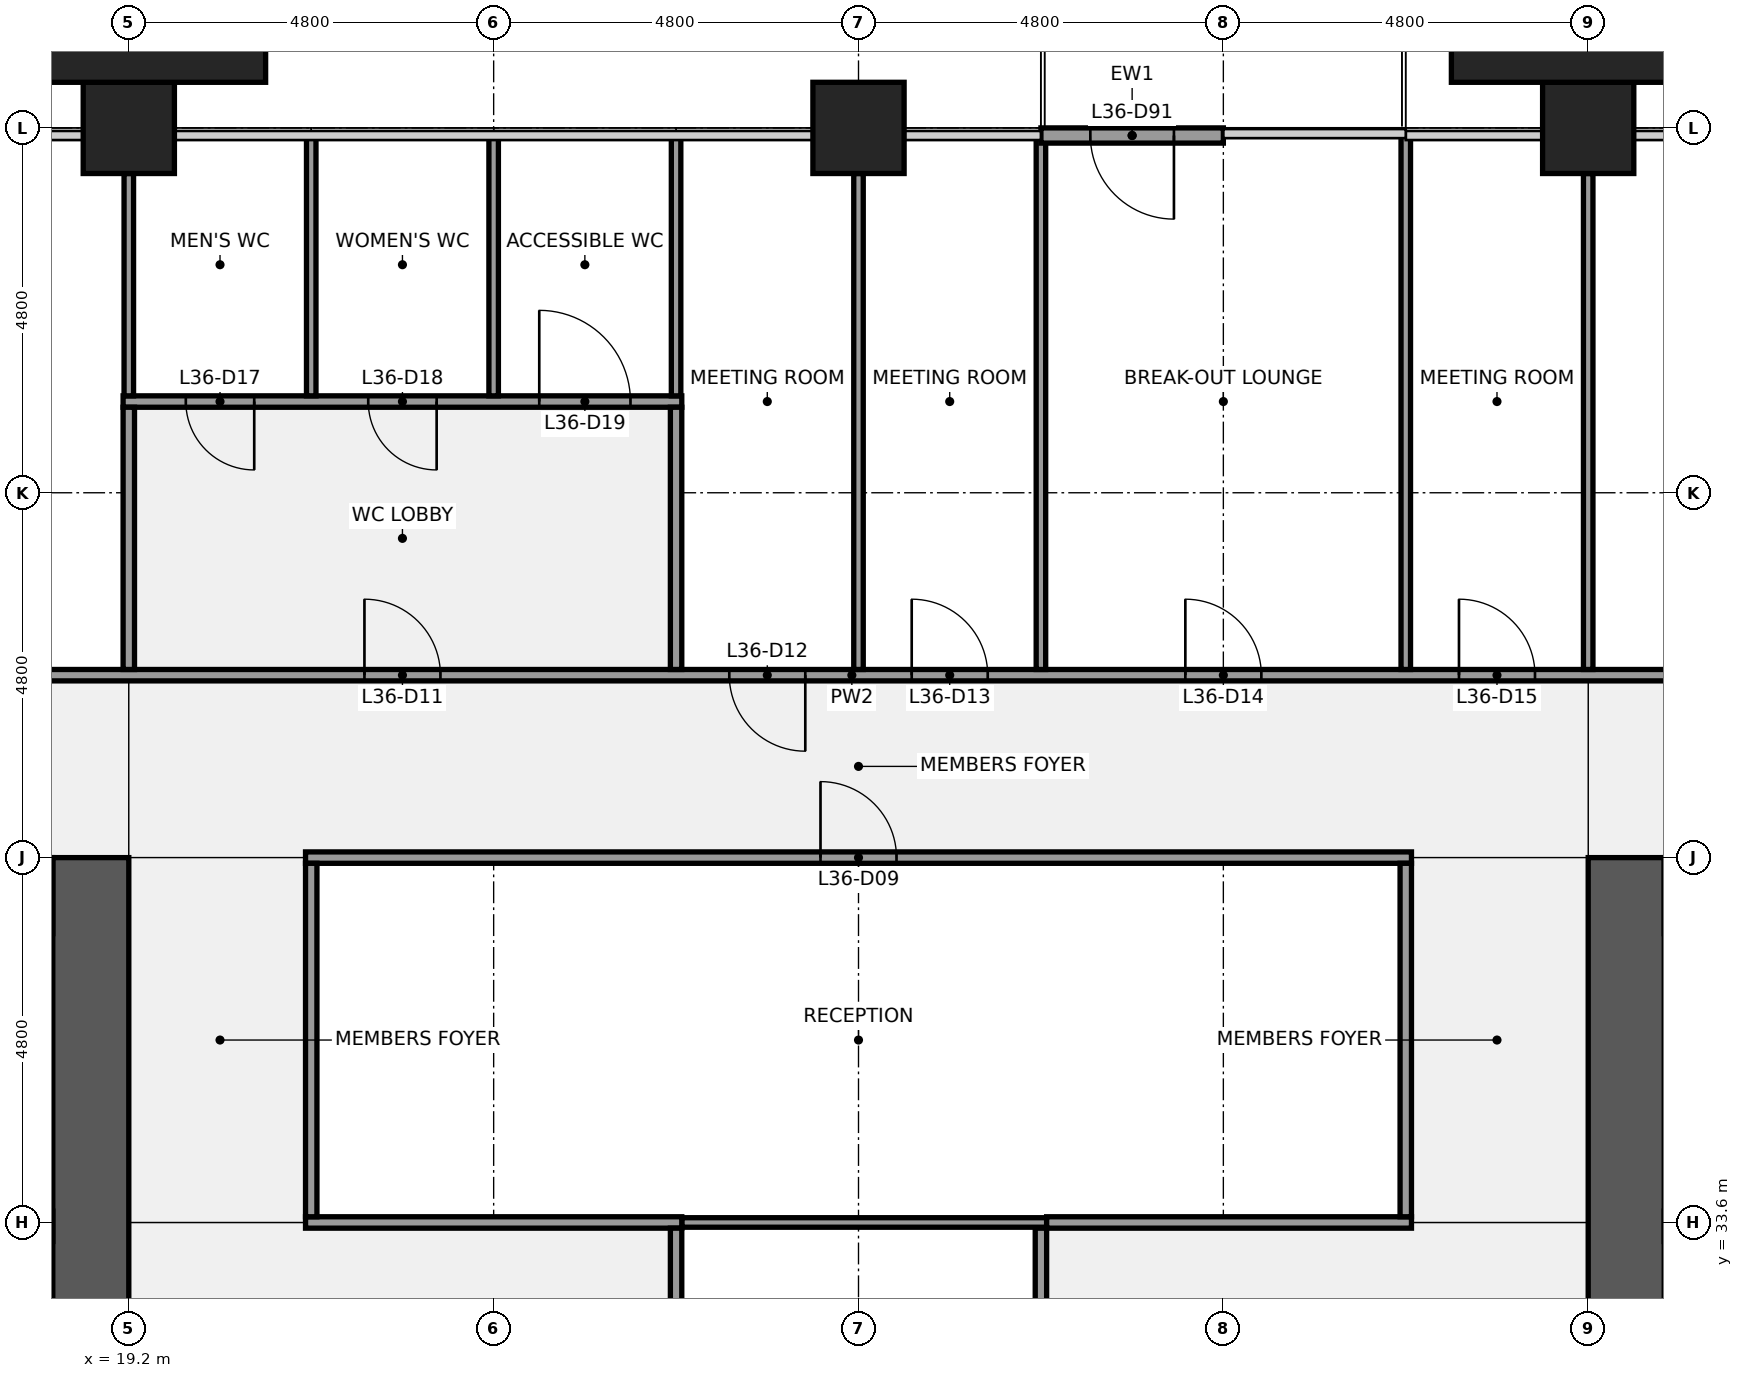
"""IFC4 building model, lengths in metres.
Left out: names, types, materials, properties, quantities, classifications, styles, units other than length and angle.
Written with IfcOpenShell. Run it as: python <this file> out.ifc"""

import sys

from ifc_helpers import new_model, si_unit, direction, frame, frame_2d, origin, origin_2d, place, context, subcontext, project, spatial, rectangle, extrude, element, fill, save


model = new_model("IFC4")
c1 = context("Model", 3, precision=1e-05, world=origin(), true_north=direction((0.0, 1.0)))
c2 = subcontext(c1, "Body", "Model", "MODEL_VIEW")
j1 = project(units=[si_unit("LENGTHUNIT", "METRE"), si_unit("PLANEANGLEUNIT", "RADIAN")], contexts=[c1])
p1 = place(None, origin())
s1 = spatial("IfcSite", under=j1, at=p1, CompositionType="ELEMENT")
p2 = place(p1, origin())
s2 = spatial("IfcBuilding", under=s1, at=p2, CompositionType="ELEMENT")
p3 = place(p2, frame((0.0, 0.0, 164.1)))
s3 = spatial("IfcBuildingStorey", under=s2, at=p3, CompositionType="ELEMENT", Elevation=164.1)
for number, where, z_axis, x_axis in (
    (1, (19.2, 48.0, 0.0), (0.0, 0.0, 1.0), (1.0, 0.0, 0.0)),
    (2, (28.8, 48.0, 0.0), (0.0, 0.0, 1.0), (1.0, 0.0, 0.0)),
    (3, (38.4, 48.0, 0.0), (0.0, 0.0, 1.0), (1.0, 0.0, 0.0)),
):
    element("IfcColumn", number, at=place(p3, frame(where, z_axis=z_axis, x_axis=x_axis)), inside=s3, PredefinedType="COLUMN", context=c2, shape_type="SweptSolid", body=[
        extrude(rectangle(XDim=1.2, YDim=1.2, at=origin_2d()), origin(), (0.0, 0.0, 1.0), 4.0),
    ])
p4 = place(p3, frame((18.7, 38.4, 0.0), z_axis=(0.0, 0.0, 1.0), x_axis=(0.0, -1.0, 0.0)))
e4 = element("IfcWall", 4, at=p4, inside=s3, PredefinedType="SHEAR", context=c2, shape_type="SweptSolid", body=[
    extrude(rectangle(XDim=28.8, YDim=1.0, at=frame_2d((14.4, 0.0))), origin(), (0.0, 0.0, 1.0), 3.84),
])
p5 = place(p4, frame((18.3, 0.0, 0.0)))
e5 = element("IfcOpeningElement", 5, at=p5, cuts=e4, PredefinedType="OPENING", context=c2, shape_type="SweptSolid", body=[
    extrude(rectangle(XDim=1.8, YDim=2.1, at=frame_2d((0.9, 1.05))), frame((0.0, 0.51, 0.0), z_axis=(0.0, -1.0, 0.0), x_axis=(1.0, 0.0, 0.0)), (0.0, 0.0, 1.0), 1.02),
])
p6 = place(p4, frame((8.7, 0.0, 0.0)))
e6 = element("IfcOpeningElement", 6, at=p6, cuts=e4, PredefinedType="OPENING", context=c2, shape_type="SweptSolid", body=[
    extrude(rectangle(XDim=1.8, YDim=2.1, at=frame_2d((0.9, 1.05))), frame((0.0, 0.51, 0.0), z_axis=(0.0, -1.0, 0.0), x_axis=(1.0, 0.0, 0.0)), (0.0, 0.0, 1.0), 1.02),
])
p7 = place(p3, frame((1.0, 33.55, 0.0), z_axis=(0.0, 0.0, 1.0), x_axis=(1.0, 0.0, 0.0)))
e7 = element("IfcWall", 7, at=p7, inside=s3, PredefinedType="SHEAR", context=c2, shape_type="SweptSolid", body=[
    extrude(rectangle(XDim=17.2, YDim=0.4, at=frame_2d((8.6, 0.0))), origin(), (0.0, 0.0, 1.0), 3.84),
])
p8 = place(p3, frame((38.9, 9.6, 0.0), z_axis=(0.0, 0.0, 1.0), x_axis=(0.0, 1.0, 0.0)))
e8 = element("IfcWall", 8, at=p8, inside=s3, PredefinedType="SHEAR", context=c2, shape_type="SweptSolid", body=[
    extrude(rectangle(XDim=28.8, YDim=1.0, at=frame_2d((14.4, 0.0))), origin(), (0.0, 0.0, 1.0), 3.84),
])
p9 = place(p8, frame((8.7, 0.0, 0.0)))
e9 = element("IfcOpeningElement", 9, at=p9, cuts=e8, PredefinedType="OPENING", context=c2, shape_type="SweptSolid", body=[
    extrude(rectangle(XDim=1.8, YDim=2.1, at=frame_2d((0.9, 1.05))), frame((0.0, 0.51, 0.0), z_axis=(0.0, -1.0, 0.0), x_axis=(1.0, 0.0, 0.0)), (0.0, 0.0, 1.0), 1.02),
])
p10 = place(p8, frame((18.3, 0.0, 0.0)))
e10 = element("IfcOpeningElement", 10, at=p10, cuts=e8, PredefinedType="OPENING", context=c2, shape_type="SweptSolid", body=[
    extrude(rectangle(XDim=1.8, YDim=2.1, at=frame_2d((0.9, 1.05))), frame((0.0, 0.51, 0.0), z_axis=(0.0, -1.0, 0.0), x_axis=(1.0, 0.0, 0.0)), (0.0, 0.0, 1.0), 1.02),
])
p11 = place(p3, frame((26.475, 33.6, 0.0), z_axis=(0.0, 0.0, 1.0), x_axis=(1.0, 0.0, 0.0)))
e11 = element("IfcWall", 11, at=p11, inside=s3, PredefinedType="PARTITIONING", context=c2, shape_type="SweptSolid", body=[
    extrude(rectangle(XDim=4.8, YDim=0.125, at=frame_2d((2.4, 0.0))), origin(), (0.0, 0.0, 1.0), 2.936),
])
p12 = place(p3, frame((21.525, 33.6, 0.0), z_axis=(0.0, 0.0, 1.0), x_axis=(1.0, 0.0, 0.0)))
e12 = element("IfcWall", 12, at=p12, inside=s3, PredefinedType="PARTITIONING", context=c2, shape_type="SweptSolid", body=[
    extrude(rectangle(XDim=4.95, YDim=0.15, at=frame_2d((2.475, 0.0))), origin(), (0.0, 0.0, 1.0), 2.936),
])
p13 = place(p3, frame((31.275, 33.6, 0.0), z_axis=(0.0, 0.0, 1.0), x_axis=(1.0, 0.0, 0.0)))
e13 = element("IfcWall", 13, at=p13, inside=s3, PredefinedType="PARTITIONING", context=c2, shape_type="SweptSolid", body=[
    extrude(rectangle(XDim=4.8, YDim=0.15, at=frame_2d((2.4, 0.0))), origin(), (0.0, 0.0, 1.0), 2.936),
])
p14 = place(p3, frame((21.525, 38.4, 0.0), z_axis=(0.0, 0.0, 1.0), x_axis=(1.0, 0.0, 0.0)))
e14 = element("IfcWall", 14, at=p14, inside=s3, PredefinedType="PARTITIONING", context=c2, shape_type="SweptSolid", body=[
    extrude(rectangle(XDim=14.55, YDim=0.15, at=frame_2d((7.275, 0.0))), origin(), (0.0, 0.0, 1.0), 2.936),
])
p15 = place(p14, frame((6.775, 0.0, 0.0)))
e15 = element("IfcOpeningElement", 15, at=p15, cuts=e14, PredefinedType="OPENING", context=c2, shape_type="SweptSolid", body=[
    extrude(rectangle(XDim=1.0, YDim=2.1, at=frame_2d((0.5, 1.05))), frame((0.0, 0.085, 0.0), z_axis=(0.0, -1.0, 0.0), x_axis=(1.0, 0.0, 0.0)), (0.0, 0.0, 1.0), 0.17),
])
p16 = place(p3, frame((9.525, 40.8, 0.0), z_axis=(0.0, 0.0, 1.0), x_axis=(1.0, 0.0, 0.0)))
e16 = element("IfcWall", 16, at=p16, inside=s3, PredefinedType="PARTITIONING", context=c2, shape_type="SweptSolid", body=[
    extrude(rectangle(XDim=38.375, YDim=0.15, at=frame_2d((19.188, 0.0))), origin(), (0.0, 0.0, 1.0), 2.936),
])
p17 = place(p16, frame((4.375, 0.0, 0.0)))
e17 = element("IfcOpeningElement", 17, at=p17, cuts=e16, PredefinedType="OPENING", context=c2, shape_type="SweptSolid", body=[
    extrude(rectangle(XDim=1.0, YDim=2.1, at=frame_2d((0.5, 1.05))), frame((0.0, 0.085, 0.0), z_axis=(0.0, -1.0, 0.0), x_axis=(1.0, 0.0, 0.0)), (0.0, 0.0, 1.0), 0.17),
])
p18 = place(p16, frame((12.775, 0.0, 0.0)))
e18 = element("IfcOpeningElement", 18, at=p18, cuts=e16, PredefinedType="OPENING", context=c2, shape_type="SweptSolid", body=[
    extrude(rectangle(XDim=1.0, YDim=2.1, at=frame_2d((0.5, 1.05))), frame((0.0, 0.085, 0.0), z_axis=(0.0, -1.0, 0.0), x_axis=(1.0, 0.0, 0.0)), (0.0, 0.0, 1.0), 0.17),
])
p19 = place(p16, frame((17.575, 0.0, 0.0)))
e19 = element("IfcOpeningElement", 19, at=p19, cuts=e16, PredefinedType="OPENING", context=c2, shape_type="SweptSolid", body=[
    extrude(rectangle(XDim=1.0, YDim=2.1, at=frame_2d((0.5, 1.05))), frame((0.0, 0.085, 0.0), z_axis=(0.0, -1.0, 0.0), x_axis=(1.0, 0.0, 0.0)), (0.0, 0.0, 1.0), 0.17),
])
p20 = place(p16, frame((19.975, 0.0, 0.0)))
e20 = element("IfcOpeningElement", 20, at=p20, cuts=e16, PredefinedType="OPENING", context=c2, shape_type="SweptSolid", body=[
    extrude(rectangle(XDim=1.0, YDim=2.1, at=frame_2d((0.5, 1.05))), frame((0.0, 0.085, 0.0), z_axis=(0.0, -1.0, 0.0), x_axis=(1.0, 0.0, 0.0)), (0.0, 0.0, 1.0), 0.17),
])
p21 = place(p16, frame((23.575, 0.0, 0.0)))
e21 = element("IfcOpeningElement", 21, at=p21, cuts=e16, PredefinedType="OPENING", context=c2, shape_type="SweptSolid", body=[
    extrude(rectangle(XDim=1.0, YDim=2.1, at=frame_2d((0.5, 1.05))), frame((0.0, 0.085, 0.0), z_axis=(0.0, -1.0, 0.0), x_axis=(1.0, 0.0, 0.0)), (0.0, 0.0, 1.0), 0.17),
])
p22 = place(p16, frame((27.175, 0.0, 0.0)))
e22 = element("IfcOpeningElement", 22, at=p22, cuts=e16, PredefinedType="OPENING", context=c2, shape_type="SweptSolid", body=[
    extrude(rectangle(XDim=1.0, YDim=2.1, at=frame_2d((0.5, 1.05))), frame((0.0, 0.085, 0.0), z_axis=(0.0, -1.0, 0.0), x_axis=(1.0, 0.0, 0.0)), (0.0, 0.0, 1.0), 0.17),
])
p23 = place(p16, frame((33.125, 0.0, 0.0)))
e23 = element("IfcOpeningElement", 23, at=p23, cuts=e16, PredefinedType="OPENING", context=c2, shape_type="SweptSolid", body=[
    extrude(rectangle(XDim=1.0, YDim=2.1, at=frame_2d((0.5, 1.05))), frame((0.0, 0.085, 0.0), z_axis=(0.0, -1.0, 0.0), x_axis=(1.0, 0.0, 0.0)), (0.0, 0.0, 1.0), 0.17),
])
p24 = place(p3, frame((19.125, 44.4, 0.0), z_axis=(0.0, 0.0, 1.0), x_axis=(1.0, 0.0, 0.0)))
e24 = element("IfcWall", 24, at=p24, inside=s3, PredefinedType="PARTITIONING", context=c2, shape_type="SweptSolid", body=[
    extrude(rectangle(XDim=7.35, YDim=0.15, at=frame_2d((3.675, 0.0))), origin(), (0.0, 0.0, 1.0), 2.936),
])
p25 = place(p24, frame((0.825, 0.0, 0.0)))
e25 = element("IfcOpeningElement", 25, at=p25, cuts=e24, PredefinedType="OPENING", context=c2, shape_type="SweptSolid", body=[
    extrude(rectangle(XDim=0.9, YDim=2.1, at=frame_2d((0.45, 1.05))), frame((0.0, 0.085, 0.0), z_axis=(0.0, -1.0, 0.0), x_axis=(1.0, 0.0, 0.0)), (0.0, 0.0, 1.0), 0.17),
])
p26 = place(p24, frame((3.225, 0.0, 0.0)))
e26 = element("IfcOpeningElement", 26, at=p26, cuts=e24, PredefinedType="OPENING", context=c2, shape_type="SweptSolid", body=[
    extrude(rectangle(XDim=0.9, YDim=2.1, at=frame_2d((0.45, 1.05))), frame((0.0, 0.085, 0.0), z_axis=(0.0, -1.0, 0.0), x_axis=(1.0, 0.0, 0.0)), (0.0, 0.0, 1.0), 0.17),
])
p27 = place(p24, frame((5.475, 0.0, 0.0)))
e27 = element("IfcOpeningElement", 27, at=p27, cuts=e24, PredefinedType="OPENING", context=c2, shape_type="SweptSolid", body=[
    extrude(rectangle(XDim=1.2, YDim=2.1, at=frame_2d((0.6, 1.05))), frame((0.0, 0.085, 0.0), z_axis=(0.0, -1.0, 0.0), x_axis=(1.0, 0.0, 0.0)), (0.0, 0.0, 1.0), 0.17),
])
p28 = place(p3, frame((19.2, 44.475, 0.0), z_axis=(0.0, 0.0, 1.0), x_axis=(0.0, 1.0, 0.0)))
e28 = element("IfcWall", 28, at=p28, inside=s3, PredefinedType="PARTITIONING", context=c2, shape_type="SweptSolid", body=[
    extrude(rectangle(XDim=2.925, YDim=0.125, at=frame_2d((1.462, 0.0))), origin(), (0.0, 0.0, 1.0), 2.936),
])
p29 = place(p3, frame((19.2, 40.875, 0.0), z_axis=(0.0, 0.0, 1.0), x_axis=(0.0, 1.0, 0.0)))
e29 = element("IfcWall", 29, at=p29, inside=s3, PredefinedType="PARTITIONING", context=c2, shape_type="SweptSolid", body=[
    extrude(rectangle(XDim=3.45, YDim=0.15, at=frame_2d((1.725, 0.0))), origin(), (0.0, 0.0, 1.0), 2.936),
])
p30 = place(p3, frame((21.6, 44.475, 0.0), z_axis=(0.0, 0.0, 1.0), x_axis=(0.0, 1.0, 0.0)))
e30 = element("IfcWall", 30, at=p30, inside=s3, PredefinedType="PARTITIONING", context=c2, shape_type="SweptSolid", body=[
    extrude(rectangle(XDim=3.425, YDim=0.125, at=frame_2d((1.712, 0.0))), origin(), (0.0, 0.0, 1.0), 2.936),
])
p31 = place(p3, frame((21.6, 33.675, 0.0), z_axis=(0.0, 0.0, 1.0), x_axis=(0.0, 1.0, 0.0)))
e31 = element("IfcWall", 31, at=p31, inside=s3, PredefinedType="PARTITIONING", context=c2, shape_type="SweptSolid", body=[
    extrude(rectangle(XDim=4.65, YDim=0.15, at=frame_2d((2.325, 0.0))), origin(), (0.0, 0.0, 1.0), 2.936),
])
for number, where, z_axis, x_axis in (
    (32, (24.0, 44.475, 0.0), (0.0, 0.0, 1.0), (0.0, 1.0, 0.0)),
    (33, (26.4, 44.475, 0.0), (0.0, 0.0, 1.0), (0.0, 1.0, 0.0)),
):
    element("IfcWall", number, at=place(p3, frame(where, z_axis=z_axis, x_axis=x_axis)), inside=s3, PredefinedType="PARTITIONING", context=c2, shape_type="SweptSolid", body=[
        extrude(rectangle(XDim=3.425, YDim=0.125, at=frame_2d((1.712, 0.0))), origin(), (0.0, 0.0, 1.0), 2.936),
    ])
for number, where, z_axis, x_axis in (
    (34, (26.4, 30.075, 0.0), (0.0, 0.0, 1.0), (0.0, 1.0, 0.0)),
    (35, (26.4, 40.875, 0.0), (0.0, 0.0, 1.0), (0.0, 1.0, 0.0)),
):
    element("IfcWall", number, at=place(p3, frame(where, z_axis=z_axis, x_axis=x_axis)), inside=s3, PredefinedType="PARTITIONING", context=c2, shape_type="SweptSolid", body=[
        extrude(rectangle(XDim=3.45, YDim=0.15, at=frame_2d((1.725, 0.0))), origin(), (0.0, 0.0, 1.0), 2.936),
    ])
p32 = place(p3, frame((28.8, 40.875, 0.0), z_axis=(0.0, 0.0, 1.0), x_axis=(0.0, 1.0, 0.0)))
e36 = element("IfcWall", 36, at=p32, inside=s3, PredefinedType="PARTITIONING", context=c2, shape_type="SweptSolid", body=[
    extrude(rectangle(XDim=6.525, YDim=0.125, at=frame_2d((3.262, 0.0))), origin(), (0.0, 0.0, 1.0), 2.936),
])
p33 = place(p3, frame((31.2, 40.875, 0.0), z_axis=(0.0, 0.0, 1.0), x_axis=(0.0, 1.0, 0.0)))
e37 = element("IfcWall", 37, at=p33, inside=s3, PredefinedType="PARTITIONING", context=c2, shape_type="SweptSolid", body=[
    extrude(rectangle(XDim=7.025, YDim=0.125, at=frame_2d((3.512, 0.0))), origin(), (0.0, 0.0, 1.0), 2.936),
])
p34 = place(p3, frame((31.2, 30.075, 0.0), z_axis=(0.0, 0.0, 1.0), x_axis=(0.0, 1.0, 0.0)))
e38 = element("IfcWall", 38, at=p34, inside=s3, PredefinedType="PARTITIONING", context=c2, shape_type="SweptSolid", body=[
    extrude(rectangle(XDim=3.45, YDim=0.15, at=frame_2d((1.725, 0.0))), origin(), (0.0, 0.0, 1.0), 2.936),
])
p35 = place(p3, frame((36.0, 40.875, 0.0), z_axis=(0.0, 0.0, 1.0), x_axis=(0.0, 1.0, 0.0)))
e39 = element("IfcWall", 39, at=p35, inside=s3, PredefinedType="PARTITIONING", context=c2, shape_type="SweptSolid", body=[
    extrude(rectangle(XDim=7.025, YDim=0.125, at=frame_2d((3.512, 0.0))), origin(), (0.0, 0.0, 1.0), 2.936),
])
p36 = place(p3, frame((36.0, 33.675, 0.0), z_axis=(0.0, 0.0, 1.0), x_axis=(0.0, 1.0, 0.0)))
e40 = element("IfcWall", 40, at=p36, inside=s3, PredefinedType="PARTITIONING", context=c2, shape_type="SweptSolid", body=[
    extrude(rectangle(XDim=4.65, YDim=0.15, at=frame_2d((2.325, 0.0))), origin(), (0.0, 0.0, 1.0), 2.936),
])
p37 = place(p3, frame((38.4, 40.875, 0.0), z_axis=(0.0, 0.0, 1.0), x_axis=(0.0, 1.0, 0.0)))
e41 = element("IfcWall", 41, at=p37, inside=s3, PredefinedType="PARTITIONING", context=c2, shape_type="SweptSolid", body=[
    extrude(rectangle(XDim=6.525, YDim=0.125, at=frame_2d((3.262, 0.0))), origin(), (0.0, 0.0, 1.0), 2.936),
])
p38 = place(p3, frame((33.6, 47.9, 0.0), z_axis=(0.0, 0.0, 1.0), x_axis=(-1.0, 0.0, 0.0)))
e42 = element("IfcWall", 42, at=p38, inside=s3, PredefinedType="SOLIDWALL", context=c2, shape_type="SweptSolid", body=[
    extrude(rectangle(XDim=2.4, YDim=0.2, at=frame_2d((1.2, 0.0))), origin(), (0.0, 0.0, 1.0), 3.314),
])
p39 = place(p38, frame((0.65, 0.0, 0.0)))
e43 = element("IfcOpeningElement", 43, at=p39, cuts=e42, PredefinedType="OPENING", context=c2, shape_type="SweptSolid", body=[
    extrude(rectangle(XDim=1.1, YDim=2.1, at=frame_2d((0.55, 1.05))), frame((0.0, 0.11, 0.0), z_axis=(0.0, -1.0, 0.0), x_axis=(1.0, 0.0, 0.0)), (0.0, 0.0, 1.0), 0.22),
])
for number, where, z_axis, x_axis in (
    (44, (19.2, 49.05, 0.0), (0.0, 0.0, 1.0), (1.0, 0.0, 0.0)),
    (45, (38.4, 49.05, 0.0), (0.0, 0.0, 1.0), (1.0, 0.0, 0.0)),
):
    element("IfcColumn", number, at=place(p3, frame(where, z_axis=z_axis, x_axis=x_axis)), inside=s3, PredefinedType="PILASTER", context=c2, shape_type="SweptSolid", body=[
        extrude(rectangle(XDim=3.6, YDim=0.9, at=origin_2d()), origin(), (0.0, 0.0, 1.0), 4.0),
    ])
p40 = place(p15, origin())
e46 = element("IfcDoor", 46, at=p40, inside=s3, OperationType="SINGLE_SWING_LEFT", PredefinedType="DOOR", context=c2, shape_type="SweptSolid", body=[
    extrude(rectangle(XDim=1.0, YDim=2.1, at=frame_2d((0.5, 1.05))), frame((0.0, 0.025, 0.0), z_axis=(0.0, -1.0, 0.0), x_axis=(1.0, 0.0, 0.0)), (0.0, 0.0, 1.0), 0.05),
])
fill(e15, e46)
p41 = place(p18, origin())
e47 = element("IfcDoor", 47, at=p41, inside=s3, OperationType="SINGLE_SWING_LEFT", PredefinedType="DOOR", context=c2, shape_type="SweptSolid", body=[
    extrude(rectangle(XDim=1.0, YDim=2.1, at=frame_2d((0.5, 1.05))), frame((0.0, 0.025, 0.0), z_axis=(0.0, -1.0, 0.0), x_axis=(1.0, 0.0, 0.0)), (0.0, 0.0, 1.0), 0.05),
])
fill(e18, e47)
p42 = place(p19, origin())
e48 = element("IfcDoor", 48, at=p42, inside=s3, OperationType="SINGLE_SWING_RIGHT", PredefinedType="DOOR", context=c2, shape_type="SweptSolid", body=[
    extrude(rectangle(XDim=1.0, YDim=2.1, at=frame_2d((0.5, 1.05))), frame((0.0, 0.025, 0.0), z_axis=(0.0, -1.0, 0.0), x_axis=(1.0, 0.0, 0.0)), (0.0, 0.0, 1.0), 0.05),
])
fill(e19, e48)
p43 = place(p20, origin())
e49 = element("IfcDoor", 49, at=p43, inside=s3, OperationType="SINGLE_SWING_LEFT", PredefinedType="DOOR", context=c2, shape_type="SweptSolid", body=[
    extrude(rectangle(XDim=1.0, YDim=2.1, at=frame_2d((0.5, 1.05))), frame((0.0, 0.025, 0.0), z_axis=(0.0, -1.0, 0.0), x_axis=(1.0, 0.0, 0.0)), (0.0, 0.0, 1.0), 0.05),
])
fill(e20, e49)
p44 = place(p21, origin())
e50 = element("IfcDoor", 50, at=p44, inside=s3, OperationType="SINGLE_SWING_LEFT", PredefinedType="DOOR", context=c2, shape_type="SweptSolid", body=[
    extrude(rectangle(XDim=1.0, YDim=2.1, at=frame_2d((0.5, 1.05))), frame((0.0, 0.025, 0.0), z_axis=(0.0, -1.0, 0.0), x_axis=(1.0, 0.0, 0.0)), (0.0, 0.0, 1.0), 0.05),
])
fill(e21, e50)
p45 = place(p22, origin())
e51 = element("IfcDoor", 51, at=p45, inside=s3, OperationType="SINGLE_SWING_LEFT", PredefinedType="DOOR", context=c2, shape_type="SweptSolid", body=[
    extrude(rectangle(XDim=1.0, YDim=2.1, at=frame_2d((0.5, 1.05))), frame((0.0, 0.025, 0.0), z_axis=(0.0, -1.0, 0.0), x_axis=(1.0, 0.0, 0.0)), (0.0, 0.0, 1.0), 0.05),
])
fill(e22, e51)
p46 = place(p25, origin())
e52 = element("IfcDoor", 52, at=p46, inside=s3, OperationType="SINGLE_SWING_RIGHT", PredefinedType="DOOR", context=c2, shape_type="SweptSolid", body=[
    extrude(rectangle(XDim=0.9, YDim=2.1, at=frame_2d((0.45, 1.05))), frame((0.0, 0.025, 0.0), z_axis=(0.0, -1.0, 0.0), x_axis=(1.0, 0.0, 0.0)), (0.0, 0.0, 1.0), 0.05),
])
fill(e25, e52)
p47 = place(p26, origin())
e53 = element("IfcDoor", 53, at=p47, inside=s3, OperationType="SINGLE_SWING_RIGHT", PredefinedType="DOOR", context=c2, shape_type="SweptSolid", body=[
    extrude(rectangle(XDim=0.9, YDim=2.1, at=frame_2d((0.45, 1.05))), frame((0.0, 0.025, 0.0), z_axis=(0.0, -1.0, 0.0), x_axis=(1.0, 0.0, 0.0)), (0.0, 0.0, 1.0), 0.05),
])
fill(e26, e53)
p48 = place(p27, origin())
e54 = element("IfcDoor", 54, at=p48, inside=s3, OperationType="SINGLE_SWING_LEFT", PredefinedType="DOOR", context=c2, shape_type="SweptSolid", body=[
    extrude(rectangle(XDim=1.2, YDim=2.1, at=frame_2d((0.6, 1.05))), frame((0.0, 0.025, 0.0), z_axis=(0.0, -1.0, 0.0), x_axis=(1.0, 0.0, 0.0)), (0.0, 0.0, 1.0), 0.05),
])
fill(e27, e54)
p49 = place(p39, origin())
e55 = element("IfcDoor", 55, at=p49, inside=s3, OperationType="SINGLE_SWING_LEFT", PredefinedType="DOOR", context=c2, shape_type="SweptSolid", body=[
    extrude(rectangle(XDim=1.1, YDim=2.1, at=frame_2d((0.55, 1.05))), frame((0.0, 0.025, 0.0), z_axis=(0.0, -1.0, 0.0), x_axis=(1.0, 0.0, 0.0)), (0.0, 0.0, 1.0), 0.05),
])
fill(e43, e55)
save(model, sys.argv[1])
